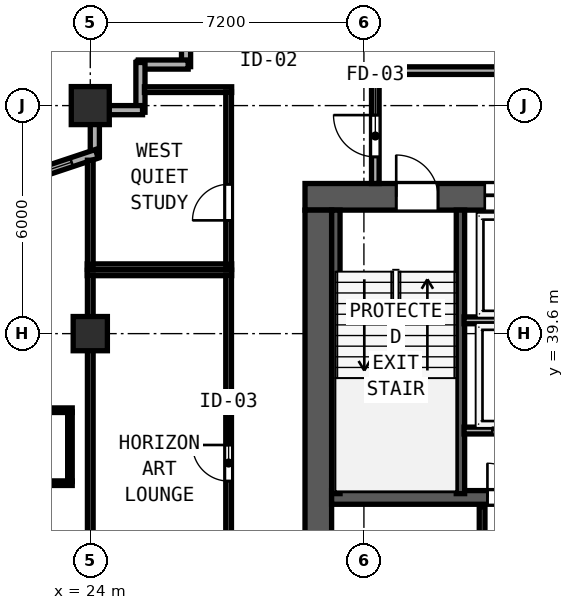
"""IFC4 building model, lengths in metres.
Left out: names, types, materials, properties, quantities, classifications, styles, units other than length and angle.
Written with IfcOpenShell. Run it as: python <this file> out.ifc"""

import sys

from ifc_helpers import new_model, si_unit, direction, frame, frame_2d, origin, origin_2d, place, context, subcontext, project, spatial, rectangle, hollow_rectangle, extrude, element, fill, save


model = new_model("IFC4")
c1 = context("Model", 3, precision=1e-05, world=origin(), true_north=direction((0.0, 1.0)))
c2 = subcontext(c1, "Body", "Model", "MODEL_VIEW")
j1 = project(units=[si_unit("LENGTHUNIT", "METRE"), si_unit("PLANEANGLEUNIT", "RADIAN")], contexts=[c1])
p1 = place(None, origin())
s1 = spatial("IfcSite", under=j1, at=p1, CompositionType="ELEMENT")
p2 = place(p1, origin())
s2 = spatial("IfcBuilding", under=s1, at=p2, CompositionType="ELEMENT")
p3 = place(p2, frame((0.0, 0.0, 144.8)))
s3 = spatial("IfcBuildingStorey", under=s2, at=p3, CompositionType="ELEMENT", Elevation=144.8)
p4 = place(p3, frame((29.65, 43.2, 0.0), z_axis=(0.0, 0.0, 1.0), x_axis=(1.0, 0.0, 0.0)))
e1 = element("IfcWall", 1, at=p4, inside=s3, PredefinedType="SHEAR", context=c2, shape_type="SweptSolid", body=[
    extrude(rectangle(XDim=17.5, YDim=0.7, at=frame_2d((8.75, 0.0))), origin(), (0.0, 0.0, 1.0), 3.6),
])
p5 = place(p4, frame((2.4, 0.0, 0.0)))
e2 = element("IfcOpeningElement", 2, at=p5, cuts=e1, PredefinedType="OPENING", context=c2, shape_type="SweptSolid", body=[
    extrude(rectangle(XDim=1.1, YDim=2.15, at=frame_2d((0.55, 1.075))), frame((0.0, 0.36, 0.0), z_axis=(0.0, -1.0, 0.0), x_axis=(1.0, 0.0, 0.0)), (0.0, 0.0, 1.0), 0.72),
])
p6 = place(p4, frame((7.51, 0.0, 0.0)))
e3 = element("IfcOpeningElement", 3, at=p6, cuts=e1, PredefinedType="OPENING", context=c2, shape_type="SweptSolid", body=[
    extrude(rectangle(XDim=1.1, YDim=2.15, at=frame_2d((0.55, 1.075))), frame((0.0, 0.36, 0.0), z_axis=(0.0, -1.0, 0.0), x_axis=(1.0, 0.0, 0.0)), (0.0, 0.0, 1.0), 0.72),
])
p7 = place(p4, frame((13.6, 0.0, 0.0)))
e4 = element("IfcOpeningElement", 4, at=p7, cuts=e1, PredefinedType="OPENING", context=c2, shape_type="SweptSolid", body=[
    extrude(rectangle(XDim=1.1, YDim=2.15, at=frame_2d((0.55, 1.075))), frame((0.0, 0.36, 0.0), z_axis=(0.0, -1.0, 0.0), x_axis=(1.0, 0.0, 0.0)), (0.0, 0.0, 1.0), 0.72),
])
p8 = place(p4, frame((4.73, 0.0, 0.0)))
e5 = element("IfcOpeningElement", 5, at=p8, cuts=e1, PredefinedType="OPENING", context=c2, shape_type="SweptSolid", body=[
    extrude(rectangle(XDim=1.1, YDim=2.2, at=frame_2d((0.55, 1.1))), frame((0.0, 0.36, 0.0), z_axis=(0.0, -1.0, 0.0), x_axis=(1.0, 0.0, 0.0)), (0.0, 0.0, 1.0), 0.72),
])
p9 = place(p4, frame((11.09, 0.0, 0.0)))
e6 = element("IfcOpeningElement", 6, at=p9, cuts=e1, PredefinedType="OPENING", context=c2, shape_type="SweptSolid", body=[
    extrude(rectangle(XDim=1.1, YDim=2.2, at=frame_2d((0.55, 1.1))), frame((0.0, 0.36, 0.0), z_axis=(0.0, -1.0, 0.0), x_axis=(1.0, 0.0, 0.0)), (0.0, 0.0, 1.0), 0.72),
])
p10 = place(p3, frame((30.0, 32.8, 0.0), z_axis=(0.0, 0.0, 1.0), x_axis=(0.0, 1.0, 0.0)))
e7 = element("IfcWall", 7, at=p10, inside=s3, PredefinedType="SHEAR", context=c2, shape_type="SweptSolid", body=[
    extrude(rectangle(XDim=10.05, YDim=0.7, at=frame_2d((5.025, 0.0))), origin(), (0.0, 0.0, 1.0), 3.6),
])
p11 = place(p3, frame((30.35, 35.29, 0.0), z_axis=(0.0, 0.0, 1.0), x_axis=(1.0, 0.0, 0.0)))
e8 = element("IfcWall", 8, at=p11, inside=s3, PredefinedType="SHEAR", context=c2, shape_type="SweptSolid", body=[
    extrude(rectangle(XDim=16.1, YDim=0.36, at=frame_2d((8.05, 0.0))), origin(), (0.0, 0.0, 1.0), 3.6),
])
p12 = place(p11, frame((5.0, 0.0, 0.0), z_axis=(0.0, 0.0, 1.0), x_axis=(-1.0, 0.0, 0.0)))
e9 = element("IfcOpeningElement", 9, at=p12, cuts=e8, PredefinedType="OPENING", context=c2, shape_type="SweptSolid", body=[
    extrude(rectangle(XDim=0.9, YDim=2.1, at=frame_2d((0.45, 1.05))), frame((0.0, 0.19, 0.0), z_axis=(0.0, -1.0, 0.0), x_axis=(1.0, 0.0, 0.0)), (0.0, 0.0, 1.0), 0.38),
])
p13 = place(p11, frame((12.06, 0.0, 0.0), z_axis=(0.0, 0.0, 1.0), x_axis=(-1.0, 0.0, 0.0)))
e10 = element("IfcOpeningElement", 10, at=p13, cuts=e8, PredefinedType="OPENING", context=c2, shape_type="SweptSolid", body=[
    extrude(rectangle(XDim=0.9, YDim=2.1, at=frame_2d((0.45, 1.05))), frame((0.0, 0.19, 0.0), z_axis=(0.0, -1.0, 0.0), x_axis=(1.0, 0.0, 0.0)), (0.0, 0.0, 1.0), 0.38),
])
for number, where, z_axis, x_axis in (
    (11, (30.462, 35.39, 0.0), (0.0, 0.0, 1.0), (0.0, 1.0, 0.0)),
    (12, (33.74, 35.39, 0.0), (0.0, 0.0, 1.0), (0.0, 1.0, 0.0)),
):
    element("IfcWall", number, at=place(p3, frame(where, z_axis=z_axis, x_axis=x_axis)), inside=s3, PredefinedType="SHEAR", context=c2, shape_type="SweptSolid", body=[
        extrude(rectangle(XDim=7.46, YDim=0.22, at=frame_2d((3.73, 0.0))), origin(), (0.0, 0.0, 1.0), 3.6),
    ])
p14 = place(p3, frame((24.0, 45.6, 0.0), z_axis=(0.0, 0.0, 1.0), x_axis=(1.0, 0.0, 0.0)))
e13 = element("IfcColumn", 13, at=p14, inside=s3, PredefinedType="COLUMN", context=c2, shape_type="SweptSolid", body=[
    extrude(hollow_rectangle(XDim=1.0, YDim=1.0, WallThickness=0.038, at=origin_2d()), origin(), (0.0, 0.0, 1.0), 3.8),
])
p15 = place(p3, frame((24.0, 39.6, 0.0), z_axis=(0.0, 0.0, 1.0), x_axis=(1.0, 0.0, 0.0)))
e14 = element("IfcColumn", 14, at=p15, inside=s3, PredefinedType="COLUMN", context=c2, shape_type="SweptSolid", body=[
    extrude(hollow_rectangle(XDim=0.9, YDim=0.9, WallThickness=0.034, at=origin_2d()), origin(), (0.0, 0.0, 1.0), 3.8),
])
p16 = place(p3, frame((26.52, 47.995, 0.0), z_axis=(0.0, 0.0, 1.0), x_axis=(0.0, -1.0, 0.0)))
e15 = element("IfcWall", 15, at=p16, inside=s3, PredefinedType="SOLIDWALL", context=c2, shape_type="SweptSolid", body=[
    extrude(rectangle(XDim=1.37, YDim=0.24, at=frame_2d((0.685, 0.0))), origin(), (0.0, 0.0, 1.0), 3.6),
])
for number, where, z_axis, x_axis in (
    (16, (26.575, 46.68, 0.0), (0.0, 0.0, 1.0), (-1.0, 0.0, 0.0)),
    (17, (25.32, 46.735, 0.0), (0.0, 0.0, 1.0), (0.0, -1.0, 0.0)),
):
    element("IfcWall", number, at=place(p3, frame(where, z_axis=z_axis, x_axis=x_axis)), inside=s3, PredefinedType="SOLIDWALL", context=c2, shape_type="SweptSolid", body=[
        extrude(rectangle(XDim=1.31, YDim=0.24, at=frame_2d((0.655, 0.0))), origin(), (0.0, 0.0, 1.0), 3.6),
    ])
p17 = place(p3, frame((25.375, 45.48, 0.0), z_axis=(0.0, 0.0, 1.0), x_axis=(-1.0, 0.0, 0.0)))
e18 = element("IfcWall", 18, at=p17, inside=s3, PredefinedType="SOLIDWALL", context=c2, shape_type="SweptSolid", body=[
    extrude(rectangle(XDim=0.883, YDim=0.24, at=frame_2d((0.441, 0.0))), origin(), (0.0, 0.0, 1.0), 3.6),
])
p18 = place(p3, frame((24.12, 45.108, 0.0), z_axis=(0.0, 0.0, 1.0), x_axis=(0.0, -1.0, 0.0)))
e19 = element("IfcWall", 19, at=p18, inside=s3, PredefinedType="SOLIDWALL", context=c2, shape_type="SweptSolid", body=[
    extrude(rectangle(XDim=0.849, YDim=0.24, at=frame_2d((0.425, 0.0))), origin(), (0.0, 0.0, 1.0), 3.145),
])
p19 = place(p3, frame((24.172, 44.331, 0.0), z_axis=(0.0, 0.0, 1.0), x_axis=(-0.948683298051, -0.316227766017, 0.0)))
e20 = element("IfcWall", 20, at=p19, inside=s3, PredefinedType="SOLIDWALL", context=c2, shape_type="SweptSolid", body=[
    extrude(rectangle(XDim=5.973, YDim=0.24, at=frame_2d((2.987, 0.0))), origin(), (0.0, 0.0, 1.0), 3.145),
])
p20 = place(p19, frame((0.7, 0.0, 0.85)))
e21 = element("IfcOpeningElement", 21, at=p20, cuts=e20, PredefinedType="OPENING", context=c2, shape_type="SweptSolid", body=[
    extrude(rectangle(XDim=1.15, YDim=1.8, at=frame_2d((0.575, 0.9))), frame((0.0, 0.13, 0.0), z_axis=(0.0, -1.0, 0.0), x_axis=(1.0, 0.0, 0.0)), (0.0, 0.0, 1.0), 0.26),
])
p21 = place(p19, frame((4.078, 0.0, 0.85)))
e22 = element("IfcOpeningElement", 22, at=p21, cuts=e20, PredefinedType="OPENING", context=c2, shape_type="SweptSolid", body=[
    extrude(rectangle(XDim=1.15, YDim=1.8, at=frame_2d((0.575, 0.9))), frame((0.0, 0.13, 0.0), z_axis=(0.0, -1.0, 0.0), x_axis=(1.0, 0.0, 0.0)), (0.0, 0.0, 1.0), 0.26),
])
p22 = place(p3, frame((31.5, 46.52, 0.0), z_axis=(0.0, 0.0, 1.0), x_axis=(1.0, 0.0, 0.0)))
e23 = element("IfcWall", 23, at=p22, inside=s3, PredefinedType="SOLIDWALL", context=c2, shape_type="SweptSolid", body=[
    extrude(rectangle(XDim=13.8, YDim=0.2, at=frame_2d((6.9, 0.0))), origin(), (0.0, 0.0, 1.0), 3.6),
])
p23 = place(p3, frame((31.5, 43.55, 0.0), z_axis=(0.0, 0.0, 1.0), x_axis=(0.0, 1.0, 0.0)))
e24 = element("IfcWall", 24, at=p23, inside=s3, PredefinedType="SOLIDWALL", context=c2, shape_type="SweptSolid", body=[
    extrude(rectangle(XDim=2.885, YDim=0.2, at=frame_2d((1.442, 0.0))), origin(), (0.0, 0.0, 1.0), 3.6),
])
p24 = place(p23, frame((1.8, 0.0, 0.0), z_axis=(0.0, 0.0, 1.0), x_axis=(-1.0, 0.0, 0.0)))
e25 = element("IfcOpeningElement", 25, at=p24, cuts=e24, PredefinedType="OPENING", context=c2, shape_type="SweptSolid", body=[
    extrude(rectangle(XDim=1.1, YDim=2.15, at=frame_2d((0.55, 1.075))), frame((0.0, 0.11, 0.0), z_axis=(0.0, -1.0, 0.0), x_axis=(1.0, 0.0, 0.0)), (0.0, 0.0, 1.0), 0.22),
])
p25 = place(p3, frame((33.835, 39.95, 0.0), z_axis=(0.0, 0.0, 1.0), x_axis=(1.0, 0.0, 0.0)))
e26 = element("IfcWall", 26, at=p25, inside=s3, PredefinedType="SOLIDWALL", context=c2, shape_type="SweptSolid", body=[
    extrude(rectangle(XDim=2.77, YDim=0.18, at=frame_2d((1.385, 0.0))), origin(), (0.0, 0.0, 1.0), 3.6),
])
p26 = place(p3, frame((33.835, 37.05, 0.0), z_axis=(0.0, 0.0, 1.0), x_axis=(1.0, 0.0, 0.0)))
e27 = element("IfcWall", 27, at=p26, inside=s3, PredefinedType="SOLIDWALL", context=c2, shape_type="SweptSolid", body=[
    extrude(rectangle(XDim=2.77, YDim=0.18, at=frame_2d((1.385, 0.0))), origin(), (0.0, 0.0, 1.0), 3.6),
])
p27 = place(p26, frame((1.945, 0.0, 0.0), z_axis=(0.0, 0.0, 1.0), x_axis=(-1.0, 0.0, 0.0)))
e28 = element("IfcOpeningElement", 28, at=p27, cuts=e27, PredefinedType="OPENING", context=c2, shape_type="SweptSolid", body=[
    extrude(rectangle(XDim=1.2, YDim=2.2, at=frame_2d((0.6, 1.1))), frame((0.0, 0.1, 0.0), z_axis=(0.0, -1.0, 0.0), x_axis=(1.0, 0.0, 0.0)), (0.0, 0.0, 1.0), 0.2),
])
p28 = place(p3, frame((34.31, 32.88, 0.0), z_axis=(0.0, 0.0, 1.0), x_axis=(0.0, 1.0, 0.0)))
e29 = element("IfcWall", 29, at=p28, inside=s3, PredefinedType="SOLIDWALL", context=c2, shape_type="SweptSolid", body=[
    extrude(rectangle(XDim=2.17, YDim=0.15, at=frame_2d((1.085, 0.0))), origin(), (0.0, 0.0, 1.0), 3.6),
])
p29 = place(p3, frame((23.92, 41.2, 0.0), z_axis=(0.0, 0.0, 1.0), x_axis=(1.0, 0.0, 0.0)))
e30 = element("IfcWall", 30, at=p29, inside=s3, PredefinedType="PARTITIONING", context=c2, shape_type="SweptSolid", body=[
    extrude(rectangle(XDim=3.8, YDim=0.15, at=frame_2d((1.9, 0.0))), origin(), (0.0, 0.0, 1.0), 3.6),
])
p30 = place(p3, frame((24.0, 33.06, 0.0), z_axis=(0.0, 0.0, 1.0), x_axis=(0.0, 1.0, 0.0)))
e31 = element("IfcWall", 31, at=p30, inside=s3, PredefinedType="PARTITIONING", context=c2, shape_type="SweptSolid", body=[
    extrude(rectangle(XDim=8.08, YDim=0.15, at=frame_2d((4.04, 0.0))), origin(), (0.0, 0.0, 1.0), 3.145),
])
p31 = place(p3, frame((27.64, 33.06, 0.0), z_axis=(0.0, 0.0, 1.0), x_axis=(0.0, 1.0, 0.0)))
e32 = element("IfcWall", 32, at=p31, inside=s3, PredefinedType="PARTITIONING", context=c2, shape_type="SweptSolid", body=[
    extrude(rectangle(XDim=8.08, YDim=0.15, at=frame_2d((4.04, 0.0))), origin(), (0.0, 0.0, 1.0), 3.6),
])
p32 = place(p31, frame((3.61, 0.0, 0.0), z_axis=(0.0, 0.0, 1.0), x_axis=(-1.0, 0.0, 0.0)))
e33 = element("IfcOpeningElement", 33, at=p32, cuts=e32, PredefinedType="OPENING", context=c2, shape_type="SweptSolid", body=[
    extrude(rectangle(XDim=0.95, YDim=2.12, at=frame_2d((0.475, 1.06))), frame((0.0, 0.085, 0.0), z_axis=(0.0, -1.0, 0.0), x_axis=(1.0, 0.0, 0.0)), (0.0, 0.0, 1.0), 0.17),
])
p33 = place(p3, frame((25.425, 46.02, 0.0), z_axis=(0.0, 0.0, 1.0), x_axis=(1.0, 0.0, 0.0)))
e34 = element("IfcWall", 34, at=p33, inside=s3, PredefinedType="PARTITIONING", context=c2, shape_type="SweptSolid", body=[
    extrude(rectangle(XDim=2.295, YDim=0.15, at=frame_2d((1.147, 0.0))), origin(), (0.0, 0.0, 1.0), 3.6),
])
p34 = place(p3, frame((23.92, 41.36, 0.0), z_axis=(0.0, 0.0, 1.0), x_axis=(1.0, 0.0, 0.0)))
e35 = element("IfcWall", 35, at=p34, inside=s3, PredefinedType="PARTITIONING", context=c2, shape_type="SweptSolid", body=[
    extrude(rectangle(XDim=3.8, YDim=0.15, at=frame_2d((1.9, 0.0))), origin(), (0.0, 0.0, 1.0), 3.6),
])
p35 = place(p3, frame((24.0, 41.42, 0.0), z_axis=(0.0, 0.0, 1.0), x_axis=(0.0, 1.0, 0.0)))
e36 = element("IfcWall", 36, at=p35, inside=s3, PredefinedType="PARTITIONING", context=c2, shape_type="SweptSolid", body=[
    extrude(rectangle(XDim=2.743, YDim=0.15, at=frame_2d((1.372, 0.0))), origin(), (0.0, 0.0, 1.0), 3.145),
])
p36 = place(p3, frame((27.64, 41.42, 0.0), z_axis=(0.0, 0.0, 1.0), x_axis=(0.0, 1.0, 0.0)))
e37 = element("IfcWall", 37, at=p36, inside=s3, PredefinedType="PARTITIONING", context=c2, shape_type="SweptSolid", body=[
    extrude(rectangle(XDim=4.54, YDim=0.15, at=frame_2d((2.27, 0.0))), origin(), (0.0, 0.0, 1.0), 3.6),
])
p37 = place(p36, frame((2.11, 0.0, 0.0), z_axis=(0.0, 0.0, 1.0), x_axis=(-1.0, 0.0, 0.0)))
e38 = element("IfcOpeningElement", 38, at=p37, cuts=e37, PredefinedType="OPENING", context=c2, shape_type="SweptSolid", body=[
    extrude(rectangle(XDim=0.95, YDim=2.12, at=frame_2d((0.475, 1.06))), frame((0.0, 0.085, 0.0), z_axis=(0.0, -1.0, 0.0), x_axis=(1.0, 0.0, 0.0)), (0.0, 0.0, 1.0), 0.17),
])
p38 = place(p3, frame((21.425, 37.585, 0.0), z_axis=(0.0, 0.0, 1.0), x_axis=(1.0, 0.0, 0.0)))
e39 = element("IfcWall", 39, at=p38, inside=s3, PredefinedType="PARTITIONING", context=c2, shape_type="SweptSolid", body=[
    extrude(rectangle(XDim=2.1, YDim=0.12, at=frame_2d((1.05, 0.0))), origin(), (0.0, 0.0, 1.0), 3.6),
])
p39 = place(p3, frame((21.425, 35.665, 0.0), z_axis=(0.0, 0.0, 1.0), x_axis=(1.0, 0.0, 0.0)))
e40 = element("IfcWall", 40, at=p39, inside=s3, PredefinedType="PARTITIONING", context=c2, shape_type="SweptSolid", body=[
    extrude(rectangle(XDim=2.1, YDim=0.12, at=frame_2d((1.05, 0.0))), origin(), (0.0, 0.0, 1.0), 3.6),
])
p40 = place(p39, frame((0.625, 0.0, 0.0)))
e41 = element("IfcOpeningElement", 41, at=p40, cuts=e40, PredefinedType="OPENING", context=c2, shape_type="SweptSolid", body=[
    extrude(rectangle(XDim=0.85, YDim=2.1, at=frame_2d((0.425, 1.05))), frame((0.0, 0.07, 0.0), z_axis=(0.0, -1.0, 0.0), x_axis=(1.0, 0.0, 0.0)), (0.0, 0.0, 1.0), 0.14),
])
p41 = place(p3, frame((23.465, 35.71, 0.0), z_axis=(0.0, 0.0, 1.0), x_axis=(0.0, 1.0, 0.0)))
e42 = element("IfcWall", 42, at=p41, inside=s3, PredefinedType="PARTITIONING", context=c2, shape_type="SweptSolid", body=[
    extrude(rectangle(XDim=1.83, YDim=0.12, at=frame_2d((0.915, 0.0))), origin(), (0.0, 0.0, 1.0), 3.6),
])
p42 = place(p20, origin())
e43 = element("IfcWindow", 43, at=p42, inside=s3, PartitioningType="SINGLE_PANEL", PredefinedType="WINDOW", context=c2, shape_type="SweptSolid", body=[
    extrude(rectangle(XDim=1.15, YDim=1.8, at=frame_2d((0.575, 0.9))), frame((0.0, 0.03, 0.0), z_axis=(0.0, -1.0, 0.0), x_axis=(1.0, 0.0, 0.0)), (0.0, 0.0, 1.0), 0.06),
])
fill(e21, e43)
p43 = place(p5, origin())
e44 = element("IfcDoor", 44, at=p43, inside=s3, OperationType="SINGLE_SWING_LEFT", PredefinedType="DOOR", context=c2, shape_type="SweptSolid", body=[
    extrude(rectangle(XDim=1.1, YDim=2.15, at=frame_2d((0.55, 1.075))), frame((0.0, 0.185, 0.0), z_axis=(0.0, -1.0, 0.0), x_axis=(1.0, 0.0, 0.0)), (0.0, 0.0, 1.0), 0.05),
])
fill(e2, e44)
p44 = place(p24, origin())
e45 = element("IfcDoor", 45, at=p44, inside=s3, OperationType="SINGLE_SWING_LEFT", PredefinedType="DOOR", context=c2, shape_type="SweptSolid", body=[
    extrude(rectangle(XDim=1.1, YDim=2.15, at=frame_2d((0.55, 1.075))), frame((0.0, 0.025, 0.0), z_axis=(0.0, -1.0, 0.0), x_axis=(1.0, 0.0, 0.0)), (0.0, 0.0, 1.0), 0.05),
])
fill(e25, e45)
p45 = place(p8, origin())
e46 = element("IfcDoor", 46, at=p45, inside=s3, OperationType="SLIDING_TO_LEFT", PredefinedType="DOOR", context=c2, shape_type="SweptSolid", body=[
    extrude(rectangle(XDim=1.1, YDim=2.2, at=frame_2d((0.55, 1.1))), frame((0.0, 0.185, 0.0), z_axis=(0.0, -1.0, 0.0), x_axis=(1.0, 0.0, 0.0)), (0.0, 0.0, 1.0), 0.05),
])
fill(e5, e46)
p46 = place(p27, origin())
e47 = element("IfcDoor", 47, at=p46, inside=s3, OperationType="SLIDING_TO_RIGHT", PredefinedType="DOOR", context=c2, shape_type="SweptSolid", body=[
    extrude(rectangle(XDim=1.2, YDim=2.2, at=frame_2d((0.6, 1.1))), frame((0.0, 0.025, 0.0), z_axis=(0.0, -1.0, 0.0), x_axis=(1.0, 0.0, 0.0)), (0.0, 0.0, 1.0), 0.05),
])
fill(e28, e47)
p47 = place(p12, origin())
e48 = element("IfcDoor", 48, at=p47, inside=s3, OperationType="SINGLE_SWING_RIGHT", PredefinedType="DOOR", context=c2, shape_type="SweptSolid", body=[
    extrude(rectangle(XDim=0.9, YDim=2.1, at=frame_2d((0.45, 1.05))), frame((0.0, 0.025, 0.0), z_axis=(0.0, -1.0, 0.0), x_axis=(1.0, 0.0, 0.0)), (0.0, 0.0, 1.0), 0.05),
])
fill(e9, e48)
p48 = place(p32, origin())
e49 = element("IfcDoor", 49, at=p48, inside=s3, OperationType="SINGLE_SWING_LEFT", PredefinedType="DOOR", context=c2, shape_type="SweptSolid", body=[
    extrude(rectangle(XDim=0.95, YDim=2.12, at=frame_2d((0.475, 1.06))), frame((0.0, 0.025, 0.0), z_axis=(0.0, -1.0, 0.0), x_axis=(1.0, 0.0, 0.0)), (0.0, 0.0, 1.0), 0.05),
])
fill(e33, e49)
p49 = place(p37, origin())
e50 = element("IfcDoor", 50, at=p49, inside=s3, OperationType="SINGLE_SWING_RIGHT", PredefinedType="DOOR", context=c2, shape_type="SweptSolid", body=[
    extrude(rectangle(XDim=0.95, YDim=2.12, at=frame_2d((0.475, 1.06))), frame((0.0, 0.025, 0.0), z_axis=(0.0, -1.0, 0.0), x_axis=(1.0, 0.0, 0.0)), (0.0, 0.0, 1.0), 0.05),
])
fill(e38, e50)
save(model, sys.argv[1])
